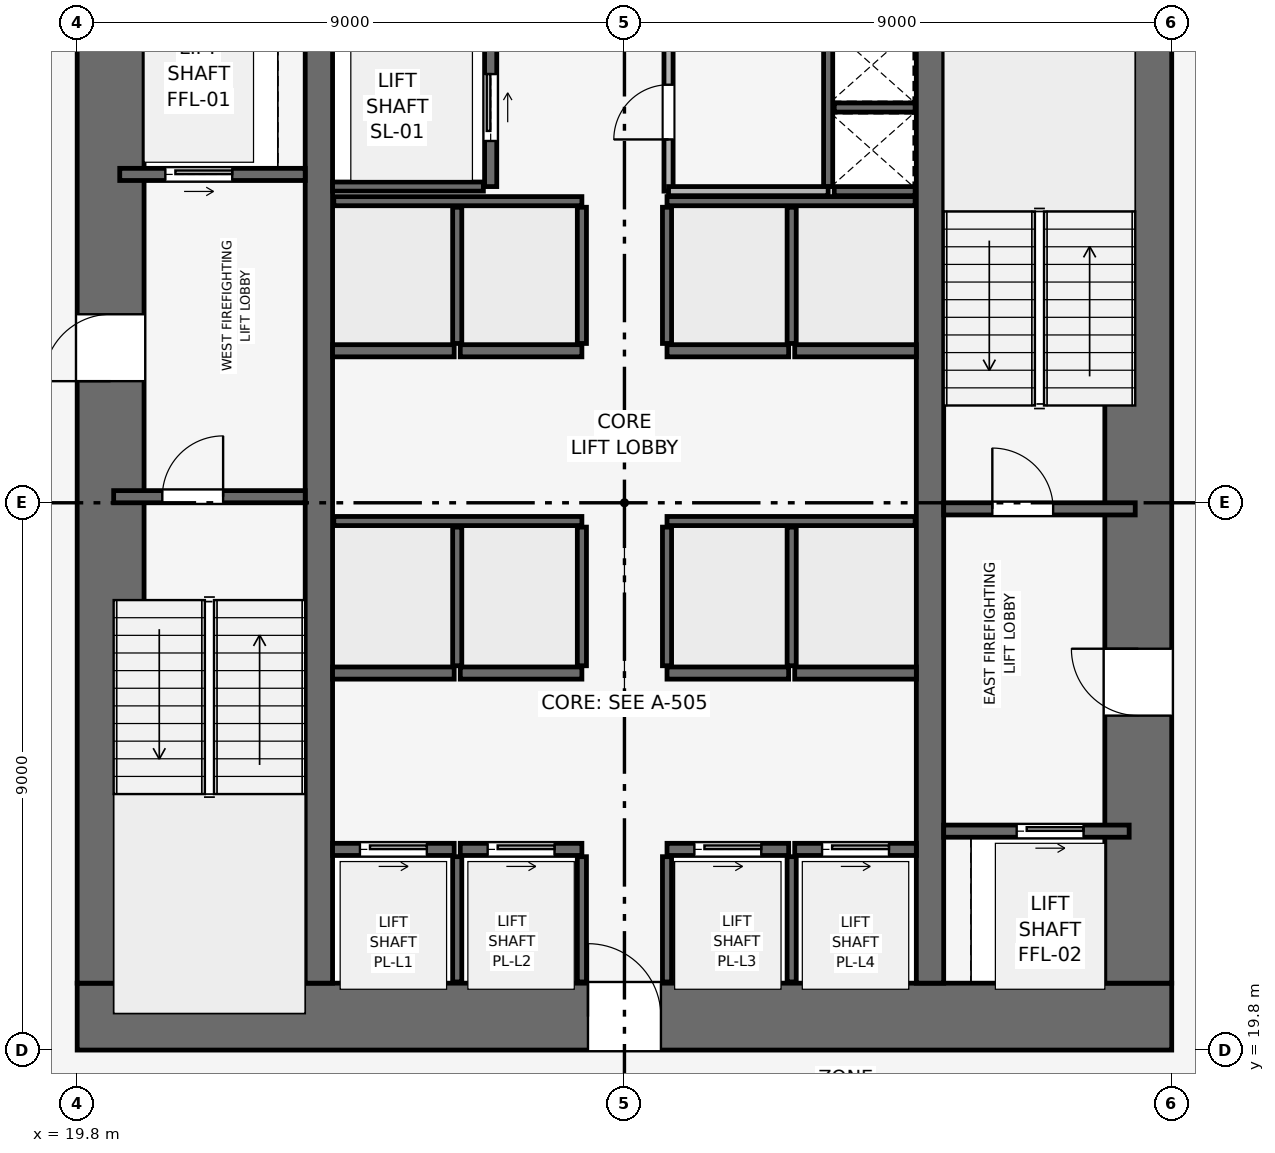
"""IFC4 building model, lengths in metres.
Left out: names, types, materials, properties, quantities, classifications, styles, units other than length and angle.
Written with IfcOpenShell. Run it as: python <this file> out.ifc"""

import sys

from ifc_helpers import new_model, si_unit, direction, frame, frame_2d, origin, place, context, subcontext, project, spatial, rectangle, extrude, element, fill, save


model = new_model("IFC4")
c1 = context("Model", 3, precision=1e-05, world=origin(), true_north=direction((0.0, 1.0)))
c2 = subcontext(c1, "Body", "Model", "MODEL_VIEW")
j1 = project(units=[si_unit("LENGTHUNIT", "METRE"), si_unit("PLANEANGLEUNIT", "RADIAN")], contexts=[c1])
p1 = place(None, origin())
s1 = spatial("IfcSite", under=j1, at=p1, CompositionType="ELEMENT")
p2 = place(p1, origin())
s2 = spatial("IfcBuilding", under=s1, at=p2, CompositionType="ELEMENT")
p3 = place(p2, frame((0.0, 0.0, 96.3)))
s3 = spatial("IfcBuildingStorey", under=s2, at=p3, CompositionType="ELEMENT", Elevation=96.3)
p4 = place(p3, frame((19.8, 20.35, 0.0), z_axis=(0.0, 0.0, 1.0), x_axis=(1.0, 0.0, 0.0)))
e1 = element("IfcWall", 1, at=p4, inside=s3, PredefinedType="SHEAR", context=c2, shape_type="SweptSolid", body=[
    extrude(rectangle(XDim=18.0, YDim=1.1, at=frame_2d((9.0, 0.0))), origin(), (0.0, 0.0, 1.0), 3.9),
])
p5 = place(p4, frame((8.4, 0.0, 0.0)))
e2 = element("IfcOpeningElement", 2, at=p5, cuts=e1, PredefinedType="OPENING", context=c2, shape_type="SweptSolid", body=[
    extrude(rectangle(XDim=1.2, YDim=2.2, at=frame_2d((0.6, 1.1))), frame((0.0, 0.56, 0.0), z_axis=(0.0, -1.0, 0.0), x_axis=(1.0, 0.0, 0.0)), (0.0, 0.0, 1.0), 1.12),
])
p6 = place(p3, frame((20.35, 20.9, 0.0), z_axis=(0.0, 0.0, 1.0), x_axis=(0.0, 1.0, 0.0)))
e3 = element("IfcWall", 3, at=p6, inside=s3, PredefinedType="SHEAR", context=c2, shape_type="SweptSolid", body=[
    extrude(rectangle(XDim=15.8, YDim=1.1, at=frame_2d((7.9, 0.0))), origin(), (0.0, 0.0, 1.0), 3.9),
])
p7 = place(p6, frame((9.9, 0.0, 0.0)))
e4 = element("IfcOpeningElement", 4, at=p7, cuts=e3, PredefinedType="OPENING", context=c2, shape_type="SweptSolid", body=[
    extrude(rectangle(XDim=1.1, YDim=2.15, at=frame_2d((0.55, 1.075))), frame((0.0, 0.56, 0.0), z_axis=(0.0, -1.0, 0.0), x_axis=(1.0, 0.0, 0.0)), (0.0, 0.0, 1.0), 1.12),
])
p8 = place(p3, frame((37.25, 20.9, 0.0), z_axis=(0.0, 0.0, 1.0), x_axis=(0.0, 1.0, 0.0)))
e5 = element("IfcWall", 5, at=p8, inside=s3, PredefinedType="SHEAR", context=c2, shape_type="SweptSolid", body=[
    extrude(rectangle(XDim=15.8, YDim=1.1, at=frame_2d((7.9, 0.0))), origin(), (0.0, 0.0, 1.0), 3.9),
])
p9 = place(p8, frame((4.4, 0.0, 0.0)))
e6 = element("IfcOpeningElement", 6, at=p9, cuts=e5, PredefinedType="OPENING", context=c2, shape_type="SweptSolid", body=[
    extrude(rectangle(XDim=1.1, YDim=2.15, at=frame_2d((0.55, 1.075))), frame((0.0, 0.56, 0.0), z_axis=(0.0, -1.0, 0.0), x_axis=(1.0, 0.0, 0.0)), (0.0, 0.0, 1.0), 1.12),
])
for number, where, z_axis, x_axis in (
    (7, (23.775, 20.9, 0.0), (0.0, 0.0, 1.0), (0.0, 1.0, 0.0)),
    (8, (33.825, 20.9, 0.0), (0.0, 0.0, 1.0), (0.0, 1.0, 0.0)),
):
    element("IfcWall", number, at=place(p3, frame(where, z_axis=z_axis, x_axis=x_axis)), inside=s3, PredefinedType="SHEAR", context=c2, shape_type="SweptSolid", body=[
        extrude(rectangle(XDim=15.8, YDim=0.45, at=frame_2d((7.9, 0.0))), origin(), (0.0, 0.0, 1.0), 3.9),
    ])
p10 = place(p3, frame((20.4, 28.9, 0.0), z_axis=(0.0, 0.0, 1.0), x_axis=(1.0, 0.0, 0.0)))
e9 = element("IfcWall", 9, at=p10, inside=s3, PredefinedType="SHEAR", context=c2, shape_type="SweptSolid", body=[
    extrude(rectangle(XDim=3.15, YDim=0.2, at=frame_2d((1.575, 0.0))), origin(), (0.0, 0.0, 1.0), 3.65),
])
p11 = place(p10, frame((0.8, 0.0, 0.0)))
e10 = element("IfcOpeningElement", 10, at=p11, cuts=e9, PredefinedType="OPENING", context=c2, shape_type="SweptSolid", body=[
    extrude(rectangle(XDim=1.0, YDim=2.1, at=frame_2d((0.5, 1.05))), frame((0.0, 0.11, 0.0), z_axis=(0.0, -1.0, 0.0), x_axis=(1.0, 0.0, 0.0)), (0.0, 0.0, 1.0), 0.22),
])
p12 = place(p3, frame((34.05, 28.7, 0.0), z_axis=(0.0, 0.0, 1.0), x_axis=(1.0, 0.0, 0.0)))
e11 = element("IfcWall", 11, at=p12, inside=s3, PredefinedType="SHEAR", context=c2, shape_type="SweptSolid", body=[
    extrude(rectangle(XDim=3.15, YDim=0.2, at=frame_2d((1.575, 0.0))), origin(), (0.0, 0.0, 1.0), 3.65),
])
p13 = place(p12, frame((0.8, 0.0, 0.0)))
e12 = element("IfcOpeningElement", 12, at=p13, cuts=e11, PredefinedType="OPENING", context=c2, shape_type="SweptSolid", body=[
    extrude(rectangle(XDim=1.0, YDim=2.1, at=frame_2d((0.5, 1.05))), frame((0.0, 0.11, 0.0), z_axis=(0.0, -1.0, 0.0), x_axis=(1.0, 0.0, 0.0)), (0.0, 0.0, 1.0), 0.22),
])
p14 = place(p3, frame((32.15, 34.0, 0.0), z_axis=(0.0, 0.0, 1.0), x_axis=(0.0, 1.0, 0.0)))
e13 = element("IfcWall", 13, at=p14, inside=s3, PredefinedType="SHEAR", context=c2, shape_type="SweptSolid", body=[
    extrude(rectangle(XDim=2.7, YDim=0.15, at=frame_2d((1.35, 0.0))), origin(), (0.0, 0.0, 1.0), 3.65),
])
for number, where, z_axis, x_axis in (
    (14, (32.25, 33.925, 0.0), (0.0, 0.0, 1.0), (1.0, 0.0, 0.0)),
    (15, (32.25, 35.3, 0.0), (0.0, 0.0, 1.0), (1.0, 0.0, 0.0)),
):
    element("IfcWall", number, at=place(p3, frame(where, z_axis=z_axis, x_axis=x_axis)), inside=s3, PredefinedType="SHEAR", context=c2, shape_type="SweptSolid", body=[
        extrude(rectangle(XDim=1.33, YDim=0.15, at=frame_2d((0.665, 0.0))), origin(), (0.0, 0.0, 1.0), 3.65),
    ])
p15 = place(p3, frame((20.5, 34.2, 0.0), z_axis=(0.0, 0.0, 1.0), x_axis=(1.0, 0.0, 0.0)))
e16 = element("IfcWall", 16, at=p15, inside=s3, PredefinedType="SHEAR", context=c2, shape_type="SweptSolid", body=[
    extrude(rectangle(XDim=3.05, YDim=0.2, at=frame_2d((1.525, 0.0))), origin(), (0.0, 0.0, 1.0), 3.65),
])
p16 = place(p15, frame((0.75, 0.0, 0.0)))
e17 = element("IfcOpeningElement", 17, at=p16, cuts=e16, PredefinedType="OPENING", context=c2, shape_type="SweptSolid", body=[
    extrude(rectangle(XDim=1.1, YDim=2.15, at=frame_2d((0.55, 1.075))), frame((0.0, 0.11, 0.0), z_axis=(0.0, -1.0, 0.0), x_axis=(1.0, 0.0, 0.0)), (0.0, 0.0, 1.0), 0.22),
])
p17 = place(p3, frame((34.05, 23.4, 0.0), z_axis=(0.0, 0.0, 1.0), x_axis=(1.0, 0.0, 0.0)))
e18 = element("IfcWall", 18, at=p17, inside=s3, PredefinedType="SHEAR", context=c2, shape_type="SweptSolid", body=[
    extrude(rectangle(XDim=3.05, YDim=0.2, at=frame_2d((1.525, 0.0))), origin(), (0.0, 0.0, 1.0), 3.65),
])
p18 = place(p17, frame((1.2, 0.0, 0.0)))
e19 = element("IfcOpeningElement", 19, at=p18, cuts=e18, PredefinedType="OPENING", context=c2, shape_type="SweptSolid", body=[
    extrude(rectangle(XDim=1.1, YDim=2.15, at=frame_2d((0.55, 1.075))), frame((0.0, 0.11, 0.0), z_axis=(0.0, -1.0, 0.0), x_axis=(1.0, 0.0, 0.0)), (0.0, 0.0, 1.0), 0.22),
])
p19 = place(p3, frame((26.6, 34.0, 0.0), z_axis=(0.0, 0.0, 1.0), x_axis=(0.0, 1.0, 0.0)))
e20 = element("IfcWall", 20, at=p19, inside=s3, PredefinedType="SHEAR", context=c2, shape_type="SweptSolid", body=[
    extrude(rectangle(XDim=2.7, YDim=0.2, at=frame_2d((1.35, 0.0))), origin(), (0.0, 0.0, 1.0), 3.65),
])
p20 = place(p19, frame((0.75, 0.0, 0.0)))
e21 = element("IfcOpeningElement", 21, at=p20, cuts=e20, PredefinedType="OPENING", context=c2, shape_type="SweptSolid", body=[
    extrude(rectangle(XDim=1.1, YDim=2.15, at=frame_2d((0.55, 1.075))), frame((0.0, 0.11, 0.0), z_axis=(0.0, -1.0, 0.0), x_axis=(1.0, 0.0, 0.0)), (0.0, 0.0, 1.0), 0.22),
])
p21 = place(p3, frame((24.0, 34.0, 0.0), z_axis=(0.0, 0.0, 1.0), x_axis=(1.0, 0.0, 0.0)))
e22 = element("IfcWall", 22, at=p21, inside=s3, PredefinedType="SHEAR", context=c2, shape_type="SweptSolid", body=[
    extrude(rectangle(XDim=2.48, YDim=0.15, at=frame_2d((1.24, 0.0))), origin(), (0.0, 0.0, 1.0), 3.65),
])
p22 = place(p3, frame((24.0, 23.1, 0.0), z_axis=(0.0, 0.0, 1.0), x_axis=(1.0, 0.0, 0.0)))
e23 = element("IfcWall", 23, at=p22, inside=s3, PredefinedType="SHEAR", context=c2, shape_type="SweptSolid", body=[
    extrude(rectangle(XDim=2.0, YDim=0.2, at=frame_2d((1.0, 0.0))), origin(), (0.0, 0.0, 1.0), 3.65),
])
p23 = place(p22, frame((0.45, 0.0, 0.0)))
e24 = element("IfcOpeningElement", 24, at=p23, cuts=e23, PredefinedType="OPENING", context=c2, shape_type="SweptSolid", body=[
    extrude(rectangle(XDim=1.1, YDim=2.15, at=frame_2d((0.55, 1.075))), frame((0.0, 0.11, 0.0), z_axis=(0.0, -1.0, 0.0), x_axis=(1.0, 0.0, 0.0)), (0.0, 0.0, 1.0), 0.22),
])
p24 = place(p3, frame((26.1, 23.1, 0.0), z_axis=(0.0, 0.0, 1.0), x_axis=(1.0, 0.0, 0.0)))
e25 = element("IfcWall", 25, at=p24, inside=s3, PredefinedType="SHEAR", context=c2, shape_type="SweptSolid", body=[
    extrude(rectangle(XDim=2.0, YDim=0.2, at=frame_2d((1.0, 0.0))), origin(), (0.0, 0.0, 1.0), 3.65),
])
p25 = place(p24, frame((0.45, 0.0, 0.0)))
e26 = element("IfcOpeningElement", 26, at=p25, cuts=e25, PredefinedType="OPENING", context=c2, shape_type="SweptSolid", body=[
    extrude(rectangle(XDim=1.1, YDim=2.15, at=frame_2d((0.55, 1.075))), frame((0.0, 0.11, 0.0), z_axis=(0.0, -1.0, 0.0), x_axis=(1.0, 0.0, 0.0)), (0.0, 0.0, 1.0), 0.22),
])
p26 = place(p3, frame((29.5, 23.1, 0.0), z_axis=(0.0, 0.0, 1.0), x_axis=(1.0, 0.0, 0.0)))
e27 = element("IfcWall", 27, at=p26, inside=s3, PredefinedType="SHEAR", context=c2, shape_type="SweptSolid", body=[
    extrude(rectangle(XDim=2.0, YDim=0.2, at=frame_2d((1.0, 0.0))), origin(), (0.0, 0.0, 1.0), 3.65),
])
p27 = place(p26, frame((0.45, 0.0, 0.0)))
e28 = element("IfcOpeningElement", 28, at=p27, cuts=e27, PredefinedType="OPENING", context=c2, shape_type="SweptSolid", body=[
    extrude(rectangle(XDim=1.1, YDim=2.15, at=frame_2d((0.55, 1.075))), frame((0.0, 0.11, 0.0), z_axis=(0.0, -1.0, 0.0), x_axis=(1.0, 0.0, 0.0)), (0.0, 0.0, 1.0), 0.22),
])
p28 = place(p3, frame((31.6, 23.1, 0.0), z_axis=(0.0, 0.0, 1.0), x_axis=(1.0, 0.0, 0.0)))
e29 = element("IfcWall", 29, at=p28, inside=s3, PredefinedType="SHEAR", context=c2, shape_type="SweptSolid", body=[
    extrude(rectangle(XDim=2.0, YDim=0.2, at=frame_2d((1.0, 0.0))), origin(), (0.0, 0.0, 1.0), 3.65),
])
p29 = place(p28, frame((0.45, 0.0, 0.0)))
e30 = element("IfcOpeningElement", 30, at=p29, cuts=e29, PredefinedType="OPENING", context=c2, shape_type="SweptSolid", body=[
    extrude(rectangle(XDim=1.1, YDim=2.15, at=frame_2d((0.55, 1.075))), frame((0.0, 0.11, 0.0), z_axis=(0.0, -1.0, 0.0), x_axis=(1.0, 0.0, 0.0)), (0.0, 0.0, 1.0), 0.22),
])
for number, where, z_axis, x_axis in (
    (31, (24.0, 26.0, 0.0), (0.0, 0.0, 1.0), (1.0, 0.0, 0.0)),
    (32, (26.1, 26.0, 0.0), (0.0, 0.0, 1.0), (1.0, 0.0, 0.0)),
    (33, (29.5, 26.0, 0.0), (0.0, 0.0, 1.0), (1.0, 0.0, 0.0)),
    (34, (31.6, 26.0, 0.0), (0.0, 0.0, 1.0), (1.0, 0.0, 0.0)),
    (35, (24.0, 31.3, 0.0), (0.0, 0.0, 1.0), (1.0, 0.0, 0.0)),
    (36, (26.1, 31.3, 0.0), (0.0, 0.0, 1.0), (1.0, 0.0, 0.0)),
    (37, (29.5, 31.3, 0.0), (0.0, 0.0, 1.0), (1.0, 0.0, 0.0)),
    (38, (31.6, 31.3, 0.0), (0.0, 0.0, 1.0), (1.0, 0.0, 0.0)),
):
    element("IfcWall", number, at=place(p3, frame(where, z_axis=z_axis, x_axis=x_axis)), inside=s3, PredefinedType="SHEAR", context=c2, shape_type="SweptSolid", body=[
        extrude(rectangle(XDim=2.0, YDim=0.2, at=frame_2d((1.0, 0.0))), origin(), (0.0, 0.0, 1.0), 3.65),
    ])
for number, where, z_axis, x_axis in (
    (39, (26.05, 20.92, 0.0), (0.0, 0.0, 1.0), (0.0, 1.0, 0.0)),
    (40, (28.1, 20.92, 0.0), (0.0, 0.0, 1.0), (0.0, 1.0, 0.0)),
    (41, (29.5, 20.92, 0.0), (0.0, 0.0, 1.0), (0.0, 1.0, 0.0)),
    (42, (31.55, 20.92, 0.0), (0.0, 0.0, 1.0), (0.0, 1.0, 0.0)),
):
    element("IfcWall", number, at=place(p3, frame(where, z_axis=z_axis, x_axis=x_axis)), inside=s3, PredefinedType="SHEAR", context=c2, shape_type="SweptSolid", body=[
        extrude(rectangle(XDim=2.06, YDim=0.15, at=frame_2d((1.03, 0.0))), origin(), (0.0, 0.0, 1.0), 3.65),
    ])
for number, where, z_axis, x_axis in (
    (43, (24.02, 28.5, 0.0), (0.0, 0.0, 1.0), (1.0, 0.0, 0.0)),
    (44, (29.5, 28.5, 0.0), (0.0, 0.0, 1.0), (1.0, 0.0, 0.0)),
):
    element("IfcWall", number, at=place(p3, frame(where, z_axis=z_axis, x_axis=x_axis)), inside=s3, PredefinedType="SHEAR", context=c2, shape_type="SweptSolid", body=[
        extrude(rectangle(XDim=4.08, YDim=0.15, at=frame_2d((2.04, 0.0))), origin(), (0.0, 0.0, 1.0), 3.65),
    ])
for number, where, z_axis, x_axis in (
    (45, (26.05, 26.12, 0.0), (0.0, 0.0, 1.0), (0.0, 1.0, 0.0)),
    (46, (28.1, 26.12, 0.0), (0.0, 0.0, 1.0), (0.0, 1.0, 0.0)),
    (47, (29.5, 26.12, 0.0), (0.0, 0.0, 1.0), (0.0, 1.0, 0.0)),
    (48, (31.55, 26.12, 0.0), (0.0, 0.0, 1.0), (0.0, 1.0, 0.0)),
):
    element("IfcWall", number, at=place(p3, frame(where, z_axis=z_axis, x_axis=x_axis)), inside=s3, PredefinedType="SHEAR", context=c2, shape_type="SweptSolid", body=[
        extrude(rectangle(XDim=2.28, YDim=0.15, at=frame_2d((1.14, 0.0))), origin(), (0.0, 0.0, 1.0), 3.65),
    ])
for number, where, z_axis, x_axis in (
    (49, (24.02, 33.76, 0.0), (0.0, 0.0, 1.0), (1.0, 0.0, 0.0)),
    (50, (29.5, 33.76, 0.0), (0.0, 0.0, 1.0), (1.0, 0.0, 0.0)),
):
    element("IfcWall", number, at=place(p3, frame(where, z_axis=z_axis, x_axis=x_axis)), inside=s3, PredefinedType="SHEAR", context=c2, shape_type="SweptSolid", body=[
        extrude(rectangle(XDim=4.08, YDim=0.15, at=frame_2d((2.04, 0.0))), origin(), (0.0, 0.0, 1.0), 3.65),
    ])
for number, where, z_axis, x_axis in (
    (51, (26.05, 31.42, 0.0), (0.0, 0.0, 1.0), (0.0, 1.0, 0.0)),
    (52, (28.1, 31.42, 0.0), (0.0, 0.0, 1.0), (0.0, 1.0, 0.0)),
    (53, (29.5, 31.42, 0.0), (0.0, 0.0, 1.0), (0.0, 1.0, 0.0)),
    (54, (31.55, 31.42, 0.0), (0.0, 0.0, 1.0), (0.0, 1.0, 0.0)),
):
    element("IfcWall", number, at=place(p3, frame(where, z_axis=z_axis, x_axis=x_axis)), inside=s3, PredefinedType="SHEAR", context=c2, shape_type="SweptSolid", body=[
        extrude(rectangle(XDim=2.24, YDim=0.15, at=frame_2d((1.12, 0.0))), origin(), (0.0, 0.0, 1.0), 3.65),
    ])
p30 = place(p3, frame((29.525, 33.925, 0.0), z_axis=(0.0, 0.0, 1.0), x_axis=(0.0, 1.0, 0.0)))
e55 = element("IfcWall", 55, at=p30, inside=s3, PredefinedType="PARTITIONING", context=c2, shape_type="SweptSolid", body=[
    extrude(rectangle(XDim=2.775, YDim=0.15, at=frame_2d((1.387, 0.0))), origin(), (0.0, 0.0, 1.0), 3.65),
])
p31 = place(p30, frame((0.85, 0.0, 0.0)))
e56 = element("IfcOpeningElement", 56, at=p31, cuts=e55, PredefinedType="OPENING", context=c2, shape_type="SweptSolid", body=[
    extrude(rectangle(XDim=0.9, YDim=2.1, at=frame_2d((0.45, 1.05))), frame((0.0, 0.085, 0.0), z_axis=(0.0, -1.0, 0.0), x_axis=(1.0, 0.0, 0.0)), (0.0, 0.0, 1.0), 0.17),
])
p32 = place(p3, frame((29.525, 33.925, 0.0), z_axis=(0.0, 0.0, 1.0), x_axis=(1.0, 0.0, 0.0)))
e57 = element("IfcWall", 57, at=p32, inside=s3, PredefinedType="PARTITIONING", context=c2, shape_type="SweptSolid", body=[
    extrude(rectangle(XDim=2.625, YDim=0.15, at=frame_2d((1.312, 0.0))), origin(), (0.0, 0.0, 1.0), 3.65),
])
p33 = place(p11, origin())
e58 = element("IfcDoor", 58, at=p33, inside=s3, OperationType="SINGLE_SWING_RIGHT", PredefinedType="DOOR", context=c2, shape_type="SweptSolid", body=[
    extrude(rectangle(XDim=1.0, YDim=2.1, at=frame_2d((0.5, 1.05))), frame((0.0, 0.025, 0.0), z_axis=(0.0, -1.0, 0.0), x_axis=(1.0, 0.0, 0.0)), (0.0, 0.0, 1.0), 0.05),
])
fill(e10, e58)
p34 = place(p13, origin())
e59 = element("IfcDoor", 59, at=p34, inside=s3, OperationType="SINGLE_SWING_LEFT", PredefinedType="DOOR", context=c2, shape_type="SweptSolid", body=[
    extrude(rectangle(XDim=1.0, YDim=2.1, at=frame_2d((0.5, 1.05))), frame((0.0, 0.025, 0.0), z_axis=(0.0, -1.0, 0.0), x_axis=(1.0, 0.0, 0.0)), (0.0, 0.0, 1.0), 0.05),
])
fill(e12, e59)
p35 = place(p16, origin())
e60 = element("IfcDoor", 60, at=p35, inside=s3, OperationType="SLIDING_TO_RIGHT", PredefinedType="DOOR", context=c2, shape_type="SweptSolid", body=[
    extrude(rectangle(XDim=1.1, YDim=2.15, at=frame_2d((0.55, 1.075))), frame((0.0, 0.025, 0.0), z_axis=(0.0, -1.0, 0.0), x_axis=(1.0, 0.0, 0.0)), (0.0, 0.0, 1.0), 0.05),
])
fill(e17, e60)
p36 = place(p18, origin())
e61 = element("IfcDoor", 61, at=p36, inside=s3, OperationType="SLIDING_TO_RIGHT", PredefinedType="DOOR", context=c2, shape_type="SweptSolid", body=[
    extrude(rectangle(XDim=1.1, YDim=2.15, at=frame_2d((0.55, 1.075))), frame((0.0, 0.025, 0.0), z_axis=(0.0, -1.0, 0.0), x_axis=(1.0, 0.0, 0.0)), (0.0, 0.0, 1.0), 0.05),
])
fill(e19, e61)
p37 = place(p20, origin())
e62 = element("IfcDoor", 62, at=p37, inside=s3, OperationType="SLIDING_TO_RIGHT", PredefinedType="DOOR", context=c2, shape_type="SweptSolid", body=[
    extrude(rectangle(XDim=1.1, YDim=2.15, at=frame_2d((0.55, 1.075))), frame((0.0, 0.025, 0.0), z_axis=(0.0, -1.0, 0.0), x_axis=(1.0, 0.0, 0.0)), (0.0, 0.0, 1.0), 0.05),
])
fill(e21, e62)
p38 = place(p23, origin())
e63 = element("IfcDoor", 63, at=p38, inside=s3, OperationType="SLIDING_TO_RIGHT", PredefinedType="DOOR", context=c2, shape_type="SweptSolid", body=[
    extrude(rectangle(XDim=1.1, YDim=2.15, at=frame_2d((0.55, 1.075))), frame((0.0, 0.025, 0.0), z_axis=(0.0, -1.0, 0.0), x_axis=(1.0, 0.0, 0.0)), (0.0, 0.0, 1.0), 0.05),
])
fill(e24, e63)
p39 = place(p25, origin())
e64 = element("IfcDoor", 64, at=p39, inside=s3, OperationType="SLIDING_TO_RIGHT", PredefinedType="DOOR", context=c2, shape_type="SweptSolid", body=[
    extrude(rectangle(XDim=1.1, YDim=2.15, at=frame_2d((0.55, 1.075))), frame((0.0, 0.025, 0.0), z_axis=(0.0, -1.0, 0.0), x_axis=(1.0, 0.0, 0.0)), (0.0, 0.0, 1.0), 0.05),
])
fill(e26, e64)
p40 = place(p27, origin())
e65 = element("IfcDoor", 65, at=p40, inside=s3, OperationType="SLIDING_TO_RIGHT", PredefinedType="DOOR", context=c2, shape_type="SweptSolid", body=[
    extrude(rectangle(XDim=1.1, YDim=2.15, at=frame_2d((0.55, 1.075))), frame((0.0, 0.025, 0.0), z_axis=(0.0, -1.0, 0.0), x_axis=(1.0, 0.0, 0.0)), (0.0, 0.0, 1.0), 0.05),
])
fill(e28, e65)
p41 = place(p29, origin())
e66 = element("IfcDoor", 66, at=p41, inside=s3, OperationType="SLIDING_TO_RIGHT", PredefinedType="DOOR", context=c2, shape_type="SweptSolid", body=[
    extrude(rectangle(XDim=1.1, YDim=2.15, at=frame_2d((0.55, 1.075))), frame((0.0, 0.025, 0.0), z_axis=(0.0, -1.0, 0.0), x_axis=(1.0, 0.0, 0.0)), (0.0, 0.0, 1.0), 0.05),
])
fill(e30, e66)
p42 = place(p31, origin())
e67 = element("IfcDoor", 67, at=p42, inside=s3, OperationType="SINGLE_SWING_LEFT", PredefinedType="DOOR", context=c2, shape_type="SweptSolid", body=[
    extrude(rectangle(XDim=0.9, YDim=2.1, at=frame_2d((0.45, 1.05))), frame((0.0, 0.025, 0.0), z_axis=(0.0, -1.0, 0.0), x_axis=(1.0, 0.0, 0.0)), (0.0, 0.0, 1.0), 0.05),
])
fill(e56, e67)
p43 = place(p7, origin())
e68 = element("IfcDoor", 68, at=p43, inside=s3, OperationType="SINGLE_SWING_LEFT", PredefinedType="DOOR", context=c2, shape_type="SweptSolid", body=[
    extrude(rectangle(XDim=1.1, YDim=2.15, at=frame_2d((0.55, 1.075))), frame((0.0, 0.025, 0.0), z_axis=(0.0, -1.0, 0.0), x_axis=(1.0, 0.0, 0.0)), (0.0, 0.0, 1.0), 0.05),
])
fill(e4, e68)
p44 = place(p9, origin())
e69 = element("IfcDoor", 69, at=p44, inside=s3, OperationType="SINGLE_SWING_RIGHT", PredefinedType="DOOR", context=c2, shape_type="SweptSolid", body=[
    extrude(rectangle(XDim=1.1, YDim=2.15, at=frame_2d((0.55, 1.075))), frame((0.0, 0.025, 0.0), z_axis=(0.0, -1.0, 0.0), x_axis=(1.0, 0.0, 0.0)), (0.0, 0.0, 1.0), 0.05),
])
fill(e6, e69)
p45 = place(p5, origin())
e70 = element("IfcDoor", 70, at=p45, inside=s3, OperationType="SINGLE_SWING_LEFT", PredefinedType="DOOR", context=c2, shape_type="SweptSolid", body=[
    extrude(rectangle(XDim=1.2, YDim=2.2, at=frame_2d((0.6, 1.1))), frame((0.0, 0.025, 0.0), z_axis=(0.0, -1.0, 0.0), x_axis=(1.0, 0.0, 0.0)), (0.0, 0.0, 1.0), 0.05),
])
fill(e2, e70)
save(model, sys.argv[1])
